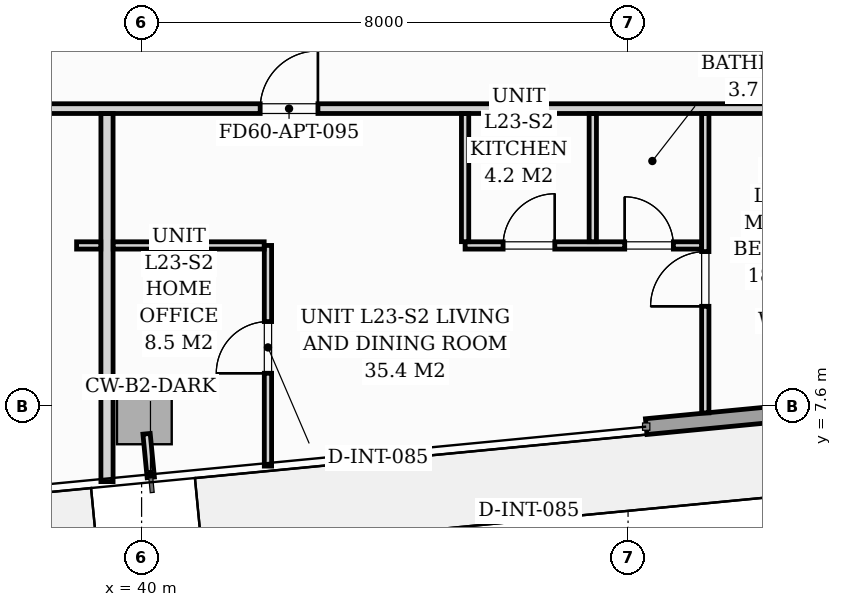
"""IFC4 building model, lengths in metres.
Left out: names, types, materials, properties, quantities, classifications, styles, units other than length and angle.
Written with IfcOpenShell. Run it as: python <this file> out.ifc"""

import sys

from ifc_helpers import new_model, si_unit, direction, frame, frame_2d, origin, origin_2d, place, context, subcontext, project, spatial, rectangle, extrude, source, transform, mapped, element, fill, save


model = new_model("IFC4")
c1 = context("Model", 3, precision=1e-05, world=origin(), true_north=direction((0.0, 1.0)))
c2 = subcontext(c1, "Body", "Model", "MODEL_VIEW")
j1 = project(units=[si_unit("LENGTHUNIT", "METRE"), si_unit("PLANEANGLEUNIT", "RADIAN")], contexts=[c1])
p1 = place(None, origin())
s1 = spatial("IfcSite", under=j1, at=p1, CompositionType="ELEMENT")
p2 = place(p1, origin())
s2 = spatial("IfcBuilding", under=s1, at=p2, CompositionType="ELEMENT")
p3 = place(p2, frame((0.0, 0.0, 84.2)))
s3 = spatial("IfcBuildingStorey", under=s2, at=p3, CompositionType="ELEMENT", Elevation=84.2)
m1 = source(origin(), c2, "Body", "SweptSolid", [
    extrude(rectangle(XDim=0.9, YDim=1.1, at=origin_2d()), origin(), (0.0, 0.0, 1.0), 3.196),
])
p4 = place(p3, frame((40.045, 7.521, 0.002), z_axis=(0.0, 0.0, 1.0), x_axis=(0.995396198367, 0.09584575252, 0.0)))
e1 = element("IfcColumn", 1, at=p4, inside=s3, PredefinedType="COLUMN", context=c2, shape_type="MappedRepresentation", body=[
    mapped(m1, transform((0.0, 0.0, 0.0), scale=1.0)),
])
p5 = place(p3, frame((67.32, 9.092, 0.0), z_axis=(0.0, 0.0, 1.0), x_axis=(-0.995396521236, -0.095842399342, 0.0)))
e2 = element("IfcWall", 2, at=p5, inside=s3, PredefinedType="STANDARD", context=c2, shape_type="SweptSolid", body=[
    extrude(rectangle(XDim=19.11, YDim=0.26, at=frame_2d((9.555, 0.0))), origin(), (0.0, 0.0, 1.0), 2.94),
])
p6 = place(p5, frame((9.774, 0.0, 0.0)))
e3 = element("IfcOpeningElement", 3, at=p6, cuts=e2, PredefinedType="OPENING", context=c2, shape_type="SweptSolid", body=[
    extrude(rectangle(XDim=1.8, YDim=2.06, at=frame_2d((0.9, 1.03))), frame((0.0, 0.14, 0.0), z_axis=(0.0, -1.0, 0.0), x_axis=(1.0, 0.0, 0.0)), (0.0, 0.0, 1.0), 0.28),
])
p7 = place(p5, frame((2.05, 0.0, 0.65)))
e4 = element("IfcOpeningElement", 4, at=p7, cuts=e2, PredefinedType="OPENING", context=c2, shape_type="SweptSolid", body=[
    extrude(rectangle(XDim=1.6, YDim=1.5, at=frame_2d((0.8, 0.75))), frame((0.0, 0.14, 0.0), z_axis=(0.0, -1.0, 0.0), x_axis=(1.0, 0.0, 0.0)), (0.0, 0.0, 1.0), 0.28),
])
p8 = place(p5, frame((15.198, 0.0, 0.75)))
e5 = element("IfcOpeningElement", 5, at=p8, cuts=e2, PredefinedType="OPENING", context=c2, shape_type="SweptSolid", body=[
    extrude(rectangle(XDim=1.6, YDim=1.5, at=frame_2d((0.8, 0.75))), frame((0.0, 0.14, 0.0), z_axis=(0.0, -1.0, 0.0), x_axis=(1.0, 0.0, 0.0)), (0.0, 0.0, 1.0), 0.28),
])
p9 = place(p3, frame((17.7, 12.49, 0.0), z_axis=(0.0, 0.0, 1.0), x_axis=(1.0, 0.0, 0.0)))
e6 = element("IfcWall", 6, at=p9, inside=s3, PredefinedType="PARTITIONING", context=c2, shape_type="SweptSolid", body=[
    extrude(rectangle(XDim=35.4, YDim=0.16, at=frame_2d((17.7, 0.0))), origin(), (0.0, 0.0, 1.0), 2.94),
])
p10 = place(p9, frame((11.19, 0.0, 0.0)))
e7 = element("IfcOpeningElement", 7, at=p10, cuts=e6, PredefinedType="OPENING", context=c2, shape_type="SweptSolid", body=[
    extrude(rectangle(XDim=0.95, YDim=2.06, at=frame_2d((0.475, 1.03))), frame((0.0, 0.09, 0.0), z_axis=(0.0, -1.0, 0.0), x_axis=(1.0, 0.0, 0.0)), (0.0, 0.0, 1.0), 0.18),
])
p11 = place(p9, frame((24.25, 0.0, 0.0)))
e8 = element("IfcOpeningElement", 8, at=p11, cuts=e6, PredefinedType="OPENING", context=c2, shape_type="SweptSolid", body=[
    extrude(rectangle(XDim=0.95, YDim=2.06, at=frame_2d((0.475, 1.03))), frame((0.0, 0.09, 0.0), z_axis=(0.0, -1.0, 0.0), x_axis=(1.0, 0.0, 0.0)), (0.0, 0.0, 1.0), 0.18),
])
p12 = place(p3, frame((39.431, 6.356, 0.0), z_axis=(0.0, 0.0, 1.0), x_axis=(0.0, 1.0, 0.0)))
e9 = element("IfcWall", 9, at=p12, inside=s3, PredefinedType="PARTITIONING", context=c2, shape_type="SweptSolid", body=[
    extrude(rectangle(XDim=6.052, YDim=0.2, at=frame_2d((3.026, 0.0))), origin(), (0.0, 0.0, 1.0), 2.94),
])
p13 = place(p3, frame((49.27, 7.487, 0.0), z_axis=(0.0, 0.0, 1.0), x_axis=(0.0, 1.0, 0.0)))
e10 = element("IfcWall", 10, at=p13, inside=s3, PredefinedType="PARTITIONING", context=c2, shape_type="SweptSolid", body=[
    extrude(rectangle(XDim=4.921, YDim=0.12, at=frame_2d((2.461, 0.0))), origin(), (0.0, 0.0, 1.0), 2.94),
])
p14 = place(p13, frame((1.752, 0.0, 0.0)))
e11 = element("IfcOpeningElement", 11, at=p14, cuts=e10, PredefinedType="OPENING", context=c2, shape_type="SweptSolid", body=[
    extrude(rectangle(XDim=0.9, YDim=2.05, at=frame_2d((0.45, 1.025))), frame((0.0, 0.07, 0.0), z_axis=(0.0, -1.0, 0.0), x_axis=(1.0, 0.0, 0.0)), (0.0, 0.0, 1.0), 0.14),
])
p15 = place(p3, frame((45.32, 10.24, 0.0), z_axis=(0.0, 0.0, 1.0), x_axis=(1.0, 0.0, 0.0)))
e12 = element("IfcWall", 12, at=p15, inside=s3, PredefinedType="PARTITIONING", context=c2, shape_type="SweptSolid", body=[
    extrude(rectangle(XDim=3.888, YDim=0.12, at=frame_2d((1.944, 0.0))), origin(), (0.0, 0.0, 1.0), 2.94),
])
p16 = place(p15, frame((0.625, 0.0, 0.0)))
e13 = element("IfcOpeningElement", 13, at=p16, cuts=e12, PredefinedType="OPENING", context=c2, shape_type="SweptSolid", body=[
    extrude(rectangle(XDim=0.85, YDim=2.05, at=frame_2d((0.425, 1.025))), frame((0.0, 0.07, 0.0), z_axis=(0.0, -1.0, 0.0), x_axis=(1.0, 0.0, 0.0)), (0.0, 0.0, 1.0), 0.14),
])
p17 = place(p15, frame((2.625, 0.0, 0.0)))
e14 = element("IfcOpeningElement", 14, at=p17, cuts=e12, PredefinedType="OPENING", context=c2, shape_type="SweptSolid", body=[
    extrude(rectangle(XDim=0.8, YDim=2.02, at=frame_2d((0.4, 1.01))), frame((0.0, 0.07, 0.0), z_axis=(0.0, -1.0, 0.0), x_axis=(1.0, 0.0, 0.0)), (0.0, 0.0, 1.0), 0.14),
])
for number, where, z_axis, x_axis in (
    (15, (47.42, 10.302, 0.0), (0.0, 0.0, 1.0), (0.0, 1.0, 0.0)),
    (16, (45.32, 10.302, 0.0), (0.0, 0.0, 1.0), (0.0, 1.0, 0.0)),
):
    element("IfcWall", number, at=place(p3, frame(where, z_axis=z_axis, x_axis=x_axis)), inside=s3, PredefinedType="PARTITIONING", context=c2, shape_type="SweptSolid", body=[
        extrude(rectangle(XDim=2.106, YDim=0.12, at=frame_2d((1.053, 0.0))), origin(), (0.0, 0.0, 1.0), 2.94),
    ])
p18 = place(p3, frame((42.078, 6.611, 0.0), z_axis=(0.0, 0.0, 1.0), x_axis=(0.0, 1.0, 0.0)))
e17 = element("IfcWall", 17, at=p18, inside=s3, PredefinedType="PARTITIONING", context=c2, shape_type="SweptSolid", body=[
    extrude(rectangle(XDim=3.629, YDim=0.12, at=frame_2d((1.814, 0.0))), origin(), (0.0, 0.0, 1.0), 2.94),
])
p19 = place(p18, frame((1.527, 0.0, 0.0)))
e18 = element("IfcOpeningElement", 18, at=p19, cuts=e17, PredefinedType="OPENING", context=c2, shape_type="SweptSolid", body=[
    extrude(rectangle(XDim=0.85, YDim=2.05, at=frame_2d((0.425, 1.025))), frame((0.0, 0.07, 0.0), z_axis=(0.0, -1.0, 0.0), x_axis=(1.0, 0.0, 0.0)), (0.0, 0.0, 1.0), 0.14),
])
p20 = place(p3, frame((38.931, 10.24, 0.0), z_axis=(0.0, 0.0, 1.0), x_axis=(1.0, 0.0, 0.0)))
e19 = element("IfcWall", 19, at=p20, inside=s3, PredefinedType="PARTITIONING", context=c2, shape_type="SweptSolid", body=[
    extrude(rectangle(XDim=0.398, YDim=0.12, at=frame_2d((0.199, 0.0))), origin(), (0.0, 0.0, 1.0), 2.94),
])
p21 = place(p3, frame((39.533, 10.24, 0.0), z_axis=(0.0, 0.0, 1.0), x_axis=(1.0, 0.0, 0.0)))
e20 = element("IfcWall", 20, at=p21, inside=s3, PredefinedType="PARTITIONING", context=c2, shape_type="SweptSolid", body=[
    extrude(rectangle(XDim=2.483, YDim=0.12, at=frame_2d((1.242, 0.0))), origin(), (0.0, 0.0, 1.0), 2.94),
])
p22 = place(p3, frame((40.082, 7.142, 0.0), z_axis=(0.0, 0.0, 1.0), x_axis=(0.095944965663, -0.995386640238, 0.0)))
e21 = element("IfcWall", 21, at=p22, inside=s3, PredefinedType="PARTITIONING", context=c2, shape_type="SweptSolid", body=[
    extrude(rectangle(XDim=0.72, YDim=0.12, at=frame_2d((0.36, 0.0))), origin(), (0.0, 0.0, 1.0), 2.94),
])
m2 = source(origin(), c2, "Body", "SweptSolid", [
    extrude(rectangle(XDim=0.85, YDim=2.05, at=frame_2d((0.425, 1.025))), frame((0.0, 0.025, 0.0), z_axis=(0.0, -1.0, 0.0), x_axis=(1.0, 0.0, 0.0)), (0.0, 0.0, 1.0), 0.05),
])
p23 = place(p19, origin())
e22 = element("IfcDoor", 22, at=p23, inside=s3, OperationType="SINGLE_SWING_LEFT", PredefinedType="DOOR", context=c2, shape_type="MappedRepresentation", body=[
    mapped(m2, transform((0.0, 0.0, 0.0), scale=1.0)),
])
fill(e18, e22)
m3 = source(origin(), c2, "Body", "SweptSolid", [
    extrude(rectangle(XDim=0.95, YDim=2.06, at=frame_2d((0.475, 1.03))), frame((0.0, 0.025, 0.0), z_axis=(0.0, -1.0, 0.0), x_axis=(1.0, 0.0, 0.0)), (0.0, 0.0, 1.0), 0.05),
])
p24 = place(p11, origin())
e23 = element("IfcDoor", 23, at=p24, inside=s3, OperationType="SINGLE_SWING_RIGHT", PredefinedType="DOOR", context=c2, shape_type="MappedRepresentation", body=[
    mapped(m3, transform((0.0, 0.0, 0.0), scale=1.0)),
])
fill(e8, e23)
m4 = source(origin(), c2, "Body", "SweptSolid", [
    extrude(rectangle(XDim=0.9, YDim=2.05, at=frame_2d((0.45, 1.025))), frame((0.0, 0.025, 0.0), z_axis=(0.0, -1.0, 0.0), x_axis=(1.0, 0.0, 0.0)), (0.0, 0.0, 1.0), 0.05),
])
p25 = place(p14, origin())
e24 = element("IfcDoor", 24, at=p25, inside=s3, OperationType="SINGLE_SWING_LEFT", PredefinedType="DOOR", context=c2, shape_type="MappedRepresentation", body=[
    mapped(m4, transform((0.0, 0.0, 0.0), scale=1.0)),
])
fill(e11, e24)
p26 = place(p16, origin())
e25 = element("IfcDoor", 25, at=p26, inside=s3, OperationType="SINGLE_SWING_RIGHT", PredefinedType="DOOR", context=c2, shape_type="MappedRepresentation", body=[
    mapped(m2, transform((0.0, 0.0, 0.0), scale=1.0)),
])
fill(e13, e25)
m5 = source(origin(), c2, "Body", "SweptSolid", [
    extrude(rectangle(XDim=0.8, YDim=2.02, at=frame_2d((0.4, 1.01))), frame((0.0, 0.025, 0.0), z_axis=(0.0, -1.0, 0.0), x_axis=(1.0, 0.0, 0.0)), (0.0, 0.0, 1.0), 0.05),
])
p27 = place(p17, origin())
e26 = element("IfcDoor", 26, at=p27, inside=s3, OperationType="SINGLE_SWING_LEFT", PredefinedType="DOOR", context=c2, shape_type="MappedRepresentation", body=[
    mapped(m5, transform((0.0, 0.0, 0.0), scale=1.0)),
])
fill(e14, e26)
save(model, sys.argv[1])
